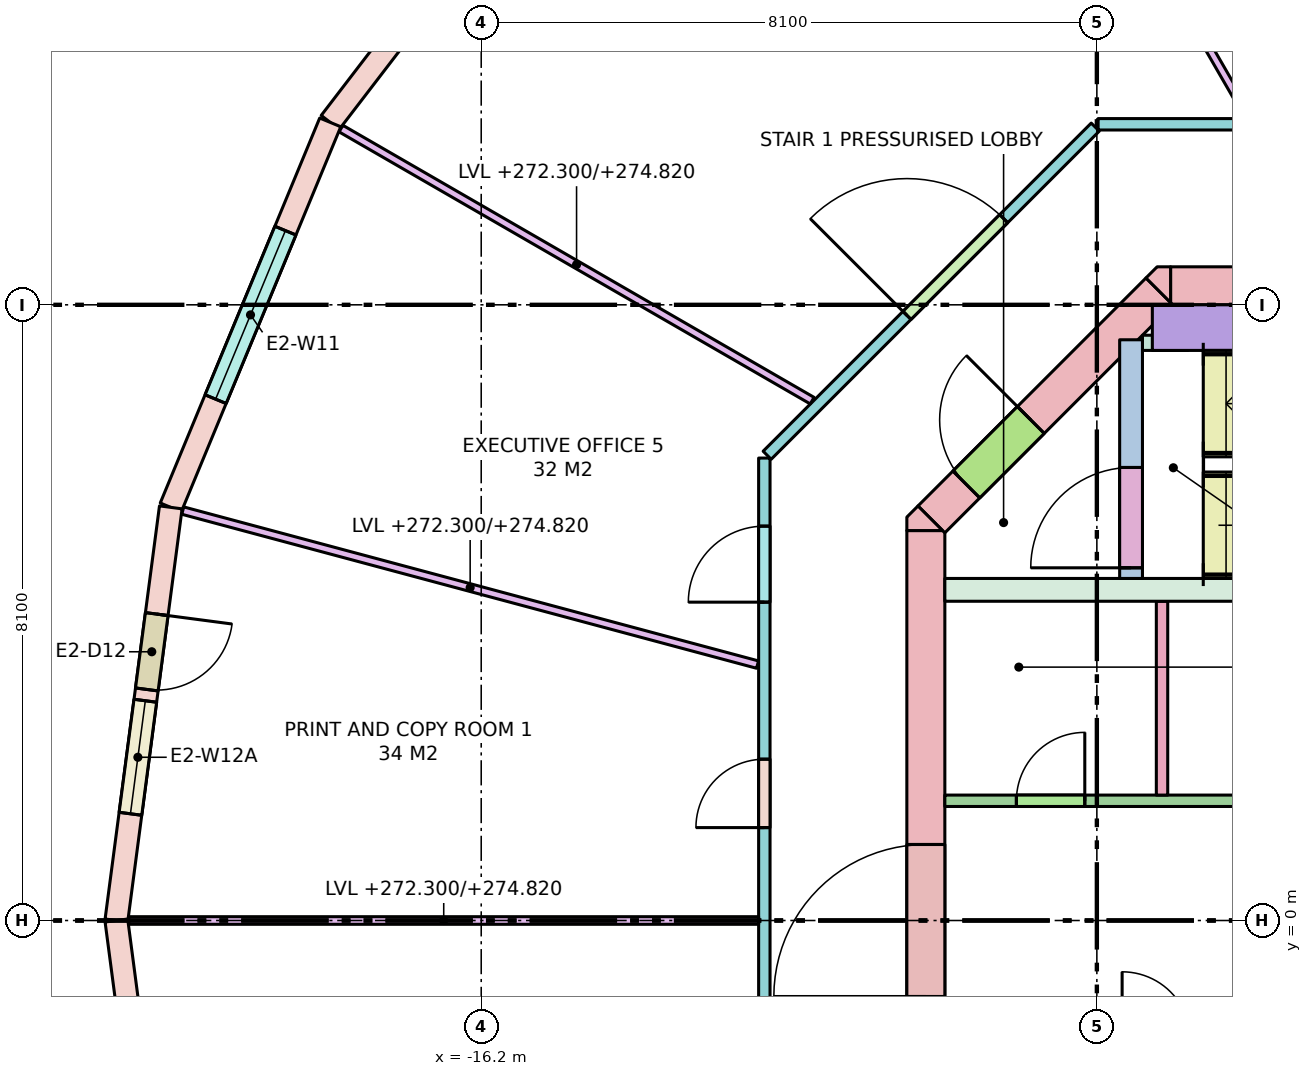
"""IFC4 building model, lengths in metres.
Left out: names, types, materials, properties, quantities, classifications, styles, units other than length and angle.
Written with IfcOpenShell. Run it as: python <this file> out.ifc"""

import sys

from ifc_helpers import new_model, si_unit, direction, frame, frame_2d, origin, place, context, subcontext, project, spatial, polyline, rectangle, outline, extrude, element, fill, save


model = new_model("IFC4")
c1 = context("Model", 3, precision=1e-05, world=origin(), true_north=direction((0.0, 1.0)))
c2 = subcontext(c1, "Body", "Model", "MODEL_VIEW")
j1 = project(units=[si_unit("LENGTHUNIT", "METRE"), si_unit("PLANEANGLEUNIT", "RADIAN")], contexts=[c1])
p1 = place(None, origin())
s1 = spatial("IfcSite", under=j1, at=p1, CompositionType="ELEMENT")
p2 = place(p1, origin())
s2 = spatial("IfcBuilding", under=s1, at=p2, CompositionType="ELEMENT")
p3 = place(p2, frame((0.0, 0.0, 272.3)))
s3 = spatial("IfcBuildingStorey", under=s2, at=p3, CompositionType="ELEMENT", Elevation=272.3)
p4 = place(p3, frame((-7.13, 8.35, -0.28), z_axis=(0.0, 0.0, 1.0), x_axis=(1.0, 0.0, 0.0)))
e1 = element("IfcWall", 1, at=p4, inside=s3, PredefinedType="SHEAR", context=c2, shape_type="SweptSolid", body=[
    extrude(rectangle(XDim=14.26, YDim=0.5, at=frame_2d((7.13, 0.0))), origin(), (0.0, 0.0, 1.0), 3.7),
])
p5 = place(p4, frame((5.48, 0.0, 0.28)))
e2 = element("IfcOpeningElement", 2, at=p5, cuts=e1, PredefinedType="OPENING", context=c2, shape_type="SweptSolid", body=[
    extrude(rectangle(XDim=0.7, YDim=2.1, at=frame_2d((0.35, 1.05))), frame((0.0, 0.26, 0.0), z_axis=(0.0, -1.0, 0.0), x_axis=(1.0, 0.0, 0.0)), (0.0, 0.0, 1.0), 0.52),
])
p6 = place(p4, frame((7.155, 0.0, 0.28)))
e3 = element("IfcOpeningElement", 3, at=p6, cuts=e1, PredefinedType="OPENING", context=c2, shape_type="SweptSolid", body=[
    extrude(rectangle(XDim=0.9, YDim=2.1, at=frame_2d((0.45, 1.05))), frame((0.0, 0.26, 0.0), z_axis=(0.0, -1.0, 0.0), x_axis=(1.0, 0.0, 0.0)), (0.0, 0.0, 1.0), 0.52),
])
p7 = place(p3, frame((-10.35, -5.13, -0.28), z_axis=(0.0, 0.0, 1.0), x_axis=(0.0, 1.0, 0.0)))
e4 = element("IfcWall", 4, at=p7, inside=s3, PredefinedType="SHEAR", context=c2, shape_type="SweptSolid", body=[
    extrude(rectangle(XDim=10.26, YDim=0.5, at=frame_2d((5.13, 0.0))), origin(), (0.0, 0.0, 1.0), 3.7),
])
p8 = place(p7, frame((4.13, 0.0, 0.28)))
e5 = element("IfcOpeningElement", 5, at=p8, cuts=e4, PredefinedType="OPENING", context=c2, shape_type="SweptSolid", body=[
    extrude(rectangle(XDim=2.0, YDim=2.1, at=frame_2d((1.0, 1.05))), frame((0.0, 0.26, 0.0), z_axis=(0.0, -1.0, 0.0), x_axis=(1.0, 0.0, 0.0)), (0.0, 0.0, 1.0), 0.52),
])
p9 = place(p3, frame((-10.277, 5.277, -0.28), z_axis=(0.0, 0.0, 1.0), x_axis=(0.707106781187, 0.707106781187, 0.0)))
e6 = element("IfcWall", 6, at=p9, inside=s3, PredefinedType="SHEAR", context=c2, shape_type="SweptSolid", body=[
    extrude(rectangle(XDim=4.243, YDim=0.5, at=frame_2d((2.121, 0.0))), origin(), (0.0, 0.0, 1.0), 3.7),
])
p10 = place(p9, frame((0.65, 0.0, 0.28)))
e7 = element("IfcOpeningElement", 7, at=p10, cuts=e6, PredefinedType="OPENING", context=c2, shape_type="SweptSolid", body=[
    extrude(rectangle(XDim=1.2, YDim=2.1, at=frame_2d((0.6, 1.05))), frame((0.0, 0.26, 0.0), z_axis=(0.0, -1.0, 0.0), x_axis=(1.0, 0.0, 0.0)), (0.0, 0.0, 1.0), 0.52),
])
p11 = place(p3, frame((0.0, 0.0, -0.28)))
e8 = element("IfcWall", 8, at=p11, inside=s3, PredefinedType="SHEAR", context=c2, shape_type="SweptSolid", body=[
    extrude(outline(polyline([(-10.454, 5.454), (-10.13, 5.13), (-10.6, 5.13), (-10.6, 5.307), (-10.454, 5.454)])), origin(), (0.0, 0.0, 1.0), 3.7),
])
p12 = place(p3, frame((0.0, 0.0, -0.28)))
e9 = element("IfcWall", 9, at=p12, inside=s3, PredefinedType="SHEAR", context=c2, shape_type="SweptSolid", body=[
    extrude(outline(polyline([(-7.307, 8.6), (-7.13, 8.6), (-7.13, 8.13), (-7.454, 8.454), (-7.307, 8.6)])), origin(), (0.0, 0.0, 1.0), 3.7),
])
p13 = place(p3, frame((-10.1, 4.35, 0.0), z_axis=(0.0, 0.0, 1.0), x_axis=(1.0, 0.0, 0.0)))
e10 = element("IfcWall", 10, at=p13, inside=s3, PredefinedType="SOLIDWALL", context=c2, shape_type="SweptSolid", body=[
    extrude(rectangle(XDim=8.1, YDim=0.3, at=frame_2d((4.05, 0.0))), origin(), (0.0, 0.0, 1.0), 3.42),
])
p14 = place(p3, frame((-7.65, 4.5, 0.0), z_axis=(0.0, 0.0, 1.0), x_axis=(0.0, 1.0, 0.0)))
e11 = element("IfcWall", 11, at=p14, inside=s3, PredefinedType="SHEAR", context=c2, shape_type="SweptSolid", body=[
    extrude(rectangle(XDim=3.14, YDim=0.3, at=frame_2d((1.57, 0.0))), origin(), (0.0, 0.0, 1.0), 3.42),
])
p15 = place(p14, frame((0.14, 0.0, 0.0)))
e12 = element("IfcOpeningElement", 12, at=p15, cuts=e11, PredefinedType="OPENING", context=c2, shape_type="SweptSolid", body=[
    extrude(rectangle(XDim=1.32, YDim=2.1, at=frame_2d((0.66, 1.05))), frame((0.0, 0.16, 0.0), z_axis=(0.0, -1.0, 0.0), x_axis=(1.0, 0.0, 0.0)), (0.0, 0.0, 1.0), 0.32),
])
p16 = place(p3, frame((-7.37, 7.8, 0.0), z_axis=(0.0, 0.0, 1.0), x_axis=(1.0, 0.0, 0.0)))
e13 = element("IfcWall", 13, at=p16, inside=s3, PredefinedType="SHEAR", context=c2, shape_type="SweptSolid", body=[
    extrude(rectangle(XDim=5.37, YDim=0.6, at=frame_2d((2.685, 0.0))), origin(), (0.0, 0.0, 1.0), 3.42),
])
p17 = place(p3, frame((-7.5, 7.6, 0.0), z_axis=(0.0, 0.0, 1.0), x_axis=(1.0, 0.0, 0.0)))
e14 = element("IfcWall", 14, at=p17, inside=s3, PredefinedType="SHEAR", context=c2, shape_type="SweptSolid", body=[
    extrude(rectangle(XDim=0.6, YDim=0.2, at=frame_2d((0.3, 0.0))), origin(), (0.0, 0.0, 1.0), 3.42),
])
p18 = place(p3, frame((-14.849, 14.849, 0.0), z_axis=(0.0, 0.0, 1.0), x_axis=(-0.608784891166, -0.793335336593, 0.0)))
e15 = element("IfcWall", 15, at=p18, inside=s3, PredefinedType="STANDARD", context=c2, shape_type="SweptSolid", body=[
    extrude(rectangle(XDim=5.482, YDim=0.3, at=frame_2d((2.741, 0.0))), origin(), (0.0, 0.0, 1.0), 3.42),
])
p19 = place(p18, frame((1.416, 0.0, 0.0)))
e16 = element("IfcOpeningElement", 16, at=p19, cuts=e15, PredefinedType="OPENING", context=c2, shape_type="SweptSolid", body=[
    extrude(rectangle(XDim=1.0, YDim=2.4, at=frame_2d((0.5, 1.2))), frame((0.0, 0.16, 0.0), z_axis=(0.0, -1.0, 0.0), x_axis=(1.0, 0.0, 0.0)), (0.0, 0.0, 1.0), 0.32),
])
p20 = place(p18, frame((2.566, 0.0, 0.8)))
e17 = element("IfcOpeningElement", 17, at=p20, cuts=e15, PredefinedType="OPENING", context=c2, shape_type="SweptSolid", body=[
    extrude(rectangle(XDim=1.5, YDim=2.4, at=frame_2d((0.75, 1.2))), frame((0.0, 0.16, 0.0), z_axis=(0.0, -1.0, 0.0), x_axis=(1.0, 0.0, 0.0)), (0.0, 0.0, 1.0), 0.32),
])
p21 = place(p3, frame((-18.187, 10.5, 0.0), z_axis=(0.0, 0.0, 1.0), x_axis=(-0.382688740813, -0.923877333662, 0.0)))
e18 = element("IfcWall", 18, at=p21, inside=s3, PredefinedType="STANDARD", context=c2, shape_type="SweptSolid", body=[
    extrude(rectangle(XDim=5.482, YDim=0.3, at=frame_2d((2.741, 0.0))), origin(), (0.0, 0.0, 1.0), 3.42),
])
p22 = place(p21, frame((1.541, 0.0, 0.8)))
e19 = element("IfcOpeningElement", 19, at=p22, cuts=e18, PredefinedType="OPENING", context=c2, shape_type="SweptSolid", body=[
    extrude(rectangle(XDim=2.4, YDim=2.4, at=frame_2d((1.2, 1.2))), frame((0.0, 0.16, 0.0), z_axis=(0.0, -1.0, 0.0), x_axis=(1.0, 0.0, 0.0)), (0.0, 0.0, 1.0), 0.32),
])
p23 = place(p3, frame((-20.284, 5.435, 0.0), z_axis=(0.0, 0.0, 1.0), x_axis=(-0.130527087244, -0.991444743541, 0.0)))
e20 = element("IfcWall", 20, at=p23, inside=s3, PredefinedType="STANDARD", context=c2, shape_type="SweptSolid", body=[
    extrude(rectangle(XDim=5.482, YDim=0.3, at=frame_2d((2.741, 0.0))), origin(), (0.0, 0.0, 1.0), 3.42),
])
p24 = place(p23, frame((1.416, 0.0, 0.0)))
e21 = element("IfcOpeningElement", 21, at=p24, cuts=e20, PredefinedType="OPENING", context=c2, shape_type="SweptSolid", body=[
    extrude(rectangle(XDim=1.0, YDim=2.4, at=frame_2d((0.5, 1.2))), frame((0.0, 0.16, 0.0), z_axis=(0.0, -1.0, 0.0), x_axis=(1.0, 0.0, 0.0)), (0.0, 0.0, 1.0), 0.32),
])
p25 = place(p23, frame((2.566, 0.0, 0.8)))
e22 = element("IfcOpeningElement", 22, at=p25, cuts=e20, PredefinedType="OPENING", context=c2, shape_type="SweptSolid", body=[
    extrude(rectangle(XDim=1.5, YDim=2.4, at=frame_2d((0.75, 1.2))), frame((0.0, 0.16, 0.0), z_axis=(0.0, -1.0, 0.0), x_axis=(1.0, 0.0, 0.0)), (0.0, 0.0, 1.0), 0.32),
])
p26 = place(p3, frame((-21.0, 0.0, 0.0), z_axis=(0.0, 0.0, 1.0), x_axis=(0.130527087244, -0.991444743541, 0.0)))
e23 = element("IfcWall", 23, at=p26, inside=s3, PredefinedType="STANDARD", context=c2, shape_type="SweptSolid", body=[
    extrude(rectangle(XDim=5.482, YDim=0.3, at=frame_2d((2.741, 0.0))), origin(), (0.0, 0.0, 1.0), 3.42),
])
p27 = place(p26, frame((1.541, 0.0, 0.8)))
e24 = element("IfcOpeningElement", 24, at=p27, cuts=e23, PredefinedType="OPENING", context=c2, shape_type="SweptSolid", body=[
    extrude(rectangle(XDim=2.4, YDim=2.4, at=frame_2d((1.2, 1.2))), frame((0.0, 0.16, 0.0), z_axis=(0.0, -1.0, 0.0), x_axis=(1.0, 0.0, 0.0)), (0.0, 0.0, 1.0), 0.32),
])
p28 = place(p3, frame((-7.242, 1.65, 0.0), z_axis=(0.0, 0.0, 1.0), x_axis=(0.0, 1.0, 0.0)))
e25 = element("IfcWall", 25, at=p28, inside=s3, PredefinedType="PARTITIONING", context=c2, shape_type="SweptSolid", body=[
    extrude(rectangle(XDim=2.55, YDim=0.15, at=frame_2d((1.275, 0.0))), origin(), (0.0, 0.0, 1.0), 3.42),
])
p29 = place(p3, frame((-10.1, 1.575, 0.0), z_axis=(0.0, 0.0, 1.0), x_axis=(1.0, 0.0, 0.0)))
e26 = element("IfcWall", 26, at=p29, inside=s3, PredefinedType="PARTITIONING", context=c2, shape_type="SweptSolid", body=[
    extrude(rectangle(XDim=8.1, YDim=0.15, at=frame_2d((4.05, 0.0))), origin(), (0.0, 0.0, 1.0), 3.42),
])
p30 = place(p29, frame((0.941, 0.0, 0.0)))
e27 = element("IfcOpeningElement", 27, at=p30, cuts=e26, PredefinedType="OPENING", context=c2, shape_type="SweptSolid", body=[
    extrude(rectangle(XDim=0.9, YDim=2.1, at=frame_2d((0.45, 1.05))), frame((0.0, 0.085, 0.0), z_axis=(0.0, -1.0, 0.0), x_axis=(1.0, 0.0, 0.0)), (0.0, 0.0, 1.0), 0.17),
])
p31 = place(p29, frame((5.066, 0.0, 0.0)))
e28 = element("IfcOpeningElement", 28, at=p31, cuts=e26, PredefinedType="OPENING", context=c2, shape_type="SweptSolid", body=[
    extrude(rectangle(XDim=0.9, YDim=2.1, at=frame_2d((0.45, 1.05))), frame((0.0, 0.085, 0.0), z_axis=(0.0, -1.0, 0.0), x_axis=(1.0, 0.0, 0.0)), (0.0, 0.0, 1.0), 0.17),
])
p32 = place(p3, frame((-12.475, -6.084, 0.0), z_axis=(0.0, 0.0, 1.0), x_axis=(0.0, 1.0, 0.0)))
e29 = element("IfcWall", 29, at=p32, inside=s3, PredefinedType="PARTITIONING", context=c2, shape_type="SweptSolid", body=[
    extrude(rectangle(XDim=12.167, YDim=0.15, at=frame_2d((6.084, 0.0))), origin(), (0.0, 0.0, 1.0), 2.52),
])
p33 = place(p32, frame((10.272, 0.0, 0.0)))
e30 = element("IfcOpeningElement", 30, at=p33, cuts=e29, PredefinedType="OPENING", context=c2, shape_type="SweptSolid", body=[
    extrude(rectangle(XDim=1.0, YDim=2.1, at=frame_2d((0.5, 1.05))), frame((0.0, 0.085, 0.0), z_axis=(0.0, -1.0, 0.0), x_axis=(1.0, 0.0, 0.0)), (0.0, 0.0, 1.0), 0.17),
])
p34 = place(p32, frame((7.306, 0.0, 0.0)))
e31 = element("IfcOpeningElement", 31, at=p34, cuts=e29, PredefinedType="OPENING", context=c2, shape_type="SweptSolid", body=[
    extrude(rectangle(XDim=0.9, YDim=2.1, at=frame_2d((0.45, 1.05))), frame((0.0, 0.085, 0.0), z_axis=(0.0, -1.0, 0.0), x_axis=(1.0, 0.0, 0.0)), (0.0, 0.0, 1.0), 0.17),
])
p35 = place(p32, frame((3.961, 0.0, 0.0)))
e32 = element("IfcOpeningElement", 32, at=p35, cuts=e29, PredefinedType="OPENING", context=c2, shape_type="SweptSolid", body=[
    extrude(rectangle(XDim=0.9, YDim=2.1, at=frame_2d((0.45, 1.05))), frame((0.0, 0.085, 0.0), z_axis=(0.0, -1.0, 0.0), x_axis=(1.0, 0.0, 0.0)), (0.0, 0.0, 1.0), 0.17),
])
p36 = place(p32, frame((0.896, 0.0, 0.0)))
e33 = element("IfcOpeningElement", 33, at=p36, cuts=e29, PredefinedType="OPENING", context=c2, shape_type="SweptSolid", body=[
    extrude(rectangle(XDim=1.0, YDim=2.1, at=frame_2d((0.5, 1.05))), frame((0.0, 0.085, 0.0), z_axis=(0.0, -1.0, 0.0), x_axis=(1.0, 0.0, 0.0)), (0.0, 0.0, 1.0), 0.17),
])
p37 = place(p3, frame((-12.438, 6.121, 0.0), z_axis=(0.0, 0.0, 1.0), x_axis=(0.707106781187, 0.707106781187, 0.0)))
e34 = element("IfcWall", 34, at=p37, inside=s3, PredefinedType="PARTITIONING", context=c2, shape_type="SweptSolid", body=[
    extrude(rectangle(XDim=6.105, YDim=0.15, at=frame_2d((3.053, 0.0))), origin(), (0.0, 0.0, 1.0), 2.52),
])
p38 = place(p37, frame((2.602, 0.0, 0.0)))
e35 = element("IfcOpeningElement", 35, at=p38, cuts=e34, PredefinedType="OPENING", context=c2, shape_type="SweptSolid", body=[
    extrude(rectangle(XDim=1.8, YDim=2.1, at=frame_2d((0.9, 1.05))), frame((0.0, 0.085, 0.0), z_axis=(0.0, -1.0, 0.0), x_axis=(1.0, 0.0, 0.0)), (0.0, 0.0, 1.0), 0.17),
])
p39 = place(p3, frame((-8.084, 10.475, 0.0), z_axis=(0.0, 0.0, 1.0), x_axis=(1.0, 0.0, 0.0)))
e36 = element("IfcWall", 36, at=p39, inside=s3, PredefinedType="PARTITIONING", context=c2, shape_type="SweptSolid", body=[
    extrude(rectangle(XDim=16.167, YDim=0.15, at=frame_2d((8.084, 0.0))), origin(), (0.0, 0.0, 1.0), 2.52),
])
p40 = place(p39, frame((13.004, 0.0, 0.0)))
e37 = element("IfcOpeningElement", 37, at=p40, cuts=e36, PredefinedType="OPENING", context=c2, shape_type="SweptSolid", body=[
    extrude(rectangle(XDim=1.0, YDim=2.1, at=frame_2d((0.5, 1.05))), frame((0.0, 0.085, 0.0), z_axis=(0.0, -1.0, 0.0), x_axis=(1.0, 0.0, 0.0)), (0.0, 0.0, 1.0), 0.17),
])
p41 = place(p39, frame((9.038, 0.0, 0.0)))
e38 = element("IfcOpeningElement", 38, at=p41, cuts=e36, PredefinedType="OPENING", context=c2, shape_type="SweptSolid", body=[
    extrude(rectangle(XDim=0.9, YDim=2.1, at=frame_2d((0.45, 1.05))), frame((0.0, 0.085, 0.0), z_axis=(0.0, -1.0, 0.0), x_axis=(1.0, 0.0, 0.0)), (0.0, 0.0, 1.0), 0.17),
])
p42 = place(p39, frame((4.556, 0.0, 0.0)))
e39 = element("IfcOpeningElement", 39, at=p42, cuts=e36, PredefinedType="OPENING", context=c2, shape_type="SweptSolid", body=[
    extrude(rectangle(XDim=1.0, YDim=2.1, at=frame_2d((0.5, 1.05))), frame((0.0, 0.085, 0.0), z_axis=(0.0, -1.0, 0.0), x_axis=(1.0, 0.0, 0.0)), (0.0, 0.0, 1.0), 0.17),
])
p43 = place(p3, frame((-6.105, 10.575, 0.0), z_axis=(0.0, 0.0, 1.0), x_axis=(-0.50001399067, 0.866017326117, 0.0)))
e40 = element("IfcWall", 40, at=p43, inside=s3, PredefinedType="PARTITIONING", context=c2, shape_type="SweptSolid", body=[
    extrude(rectangle(XDim=8.626, YDim=0.1, at=frame_2d((4.313, 0.0))), origin(), (0.0, 0.0, 1.0), 2.52),
])
p44 = place(p3, frame((-11.846, 6.839, 0.0), z_axis=(0.0, 0.0, 1.0), x_axis=(-0.866011787705, 0.500023583, 0.0)))
e41 = element("IfcWall", 41, at=p44, inside=s3, PredefinedType="PARTITIONING", context=c2, shape_type="SweptSolid", body=[
    extrude(rectangle(XDim=7.158, YDim=0.1, at=frame_2d((3.579, 0.0))), origin(), (0.0, 0.0, 1.0), 2.52),
])
p45 = place(p3, frame((-12.564, 3.367, 0.0), z_axis=(0.0, 0.0, 1.0), x_axis=(-0.965933576344, 0.258790119773, 0.0)))
e42 = element("IfcWall", 42, at=p45, inside=s3, PredefinedType="PARTITIONING", context=c2, shape_type="SweptSolid", body=[
    extrude(rectangle(XDim=7.829, YDim=0.1, at=frame_2d((3.915, 0.0))), origin(), (0.0, 0.0, 1.0), 2.52),
])
p46 = place(p3, frame((-12.55, 0.0, 0.0), z_axis=(0.0, 0.0, 1.0), x_axis=(-1.0, 0.0, 0.0)))
e43 = element("IfcWall", 43, at=p46, inside=s3, PredefinedType="PARTITIONING", context=c2, shape_type="SweptSolid", body=[
    extrude(rectangle(XDim=8.287, YDim=0.1, at=frame_2d((4.143, 0.0))), origin(), (0.0, 0.0, 1.0), 2.52),
])
p47 = place(p22, origin())
e44 = element("IfcWindow", 44, at=p47, inside=s3, PartitioningType="SINGLE_PANEL", PredefinedType="WINDOW", context=c2, shape_type="SweptSolid", body=[
    extrude(rectangle(XDim=2.4, YDim=2.4, at=frame_2d((1.2, 1.2))), frame((0.0, 0.03, 0.0), z_axis=(0.0, -1.0, 0.0), x_axis=(1.0, 0.0, 0.0)), (0.0, 0.0, 1.0), 0.06),
])
fill(e19, e44)
p48 = place(p24, origin())
e45 = element("IfcDoor", 45, at=p48, inside=s3, OperationType="SINGLE_SWING_LEFT", PredefinedType="DOOR", context=c2, shape_type="SweptSolid", body=[
    extrude(rectangle(XDim=1.0, YDim=2.4, at=frame_2d((0.5, 1.2))), frame((0.0, 0.025, 0.0), z_axis=(0.0, -1.0, 0.0), x_axis=(1.0, 0.0, 0.0)), (0.0, 0.0, 1.0), 0.05),
])
fill(e21, e45)
p49 = place(p25, origin())
e46 = element("IfcWindow", 46, at=p49, inside=s3, PartitioningType="SINGLE_PANEL", PredefinedType="WINDOW", context=c2, shape_type="SweptSolid", body=[
    extrude(rectangle(XDim=1.5, YDim=2.4, at=frame_2d((0.75, 1.2))), frame((0.0, 0.03, 0.0), z_axis=(0.0, -1.0, 0.0), x_axis=(1.0, 0.0, 0.0)), (0.0, 0.0, 1.0), 0.06),
])
fill(e22, e46)
p50 = place(p15, origin())
e47 = element("IfcDoor", 47, at=p50, inside=s3, OperationType="DOUBLE_DOOR_SINGLE_SWING", PredefinedType="DOOR", context=c2, shape_type="SweptSolid", body=[
    extrude(rectangle(XDim=1.32, YDim=2.1, at=frame_2d((0.66, 1.05))), frame((0.0, 0.025, 0.0), z_axis=(0.0, -1.0, 0.0), x_axis=(1.0, 0.0, 0.0)), (0.0, 0.0, 1.0), 0.05),
])
fill(e12, e47)
p51 = place(p10, origin())
e48 = element("IfcDoor", 48, at=p51, inside=s3, OperationType="SINGLE_SWING_RIGHT", PredefinedType="DOOR", context=c2, shape_type="SweptSolid", body=[
    extrude(rectangle(XDim=1.2, YDim=2.1, at=frame_2d((0.6, 1.05))), frame((0.0, 0.025, 0.0), z_axis=(0.0, -1.0, 0.0), x_axis=(1.0, 0.0, 0.0)), (0.0, 0.0, 1.0), 0.05),
])
fill(e7, e48)
p52 = place(p8, origin())
e49 = element("IfcDoor", 49, at=p52, inside=s3, OperationType="DOUBLE_DOOR_SINGLE_SWING", PredefinedType="DOOR", context=c2, shape_type="SweptSolid", body=[
    extrude(rectangle(XDim=2.0, YDim=2.1, at=frame_2d((1.0, 1.05))), frame((0.0, 0.025, 0.0), z_axis=(0.0, -1.0, 0.0), x_axis=(1.0, 0.0, 0.0)), (0.0, 0.0, 1.0), 0.05),
])
fill(e5, e49)
p53 = place(p30, origin())
e50 = element("IfcDoor", 50, at=p53, inside=s3, OperationType="SINGLE_SWING_RIGHT", PredefinedType="DOOR", context=c2, shape_type="SweptSolid", body=[
    extrude(rectangle(XDim=0.9, YDim=2.1, at=frame_2d((0.45, 1.05))), frame((0.0, 0.025, 0.0), z_axis=(0.0, -1.0, 0.0), x_axis=(1.0, 0.0, 0.0)), (0.0, 0.0, 1.0), 0.05),
])
fill(e27, e50)
p54 = place(p38, origin())
e51 = element("IfcDoor", 51, at=p54, inside=s3, OperationType="DOUBLE_DOOR_SINGLE_SWING", PredefinedType="DOOR", context=c2, shape_type="SweptSolid", body=[
    extrude(rectangle(XDim=1.8, YDim=2.1, at=frame_2d((0.9, 1.05))), frame((0.0, 0.025, 0.0), z_axis=(0.0, -1.0, 0.0), x_axis=(1.0, 0.0, 0.0)), (0.0, 0.0, 1.0), 0.05),
])
fill(e35, e51)
p55 = place(p33, origin())
e52 = element("IfcDoor", 52, at=p55, inside=s3, OperationType="SINGLE_SWING_LEFT", PredefinedType="DOOR", context=c2, shape_type="SweptSolid", body=[
    extrude(rectangle(XDim=1.0, YDim=2.1, at=frame_2d((0.5, 1.05))), frame((0.0, 0.025, 0.0), z_axis=(0.0, -1.0, 0.0), x_axis=(1.0, 0.0, 0.0)), (0.0, 0.0, 1.0), 0.05),
])
fill(e30, e52)
p56 = place(p34, origin())
e53 = element("IfcDoor", 53, at=p56, inside=s3, OperationType="SINGLE_SWING_LEFT", PredefinedType="DOOR", context=c2, shape_type="SweptSolid", body=[
    extrude(rectangle(XDim=0.9, YDim=2.1, at=frame_2d((0.45, 1.05))), frame((0.0, 0.025, 0.0), z_axis=(0.0, -1.0, 0.0), x_axis=(1.0, 0.0, 0.0)), (0.0, 0.0, 1.0), 0.05),
])
fill(e31, e53)
save(model, sys.argv[1])
